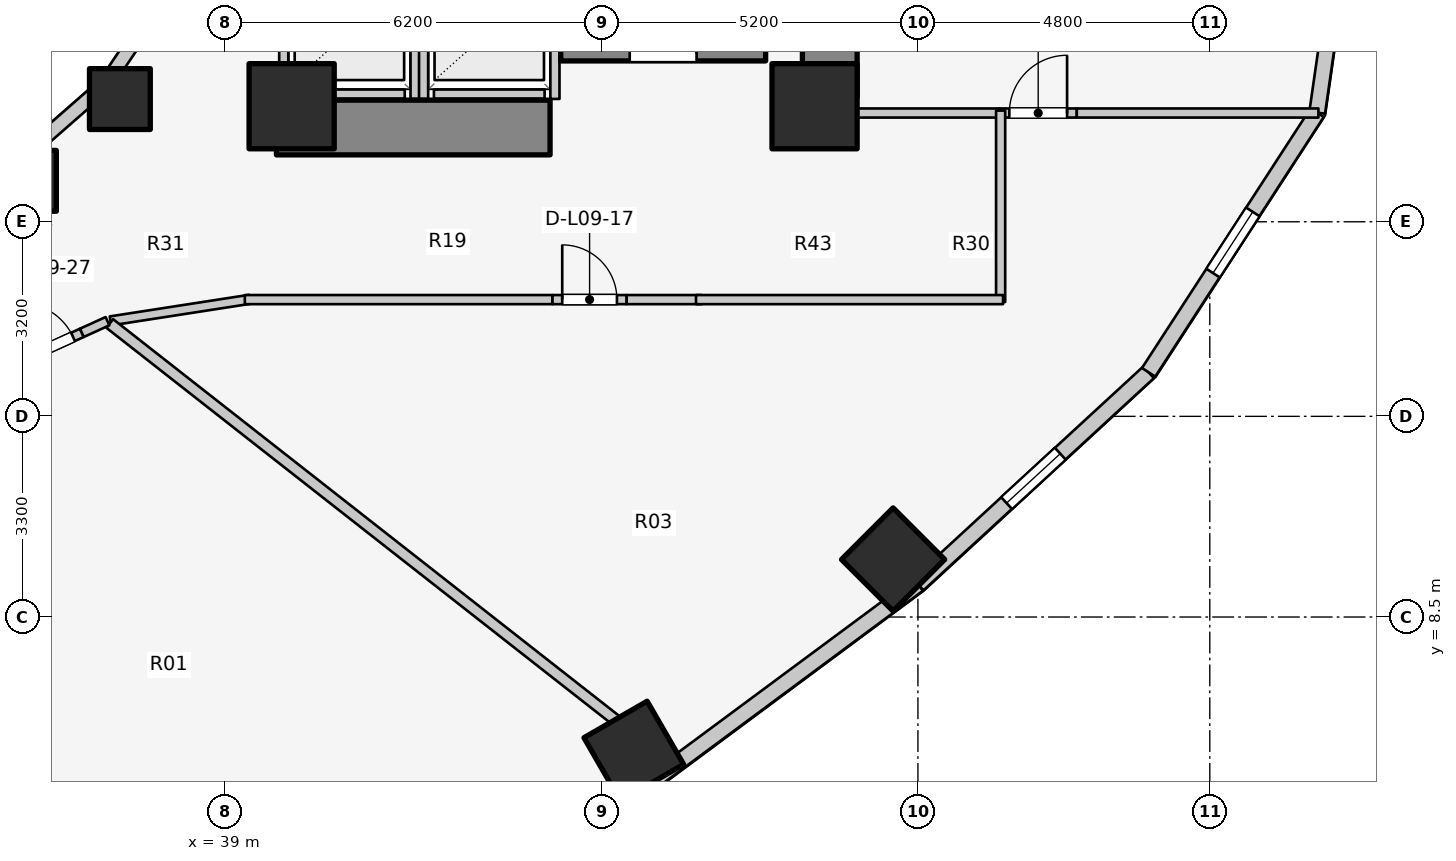
"""IFC4 building model, lengths in metres.
Left out: names, types, materials, properties, quantities, classifications, styles, units other than length and angle.
Written with IfcOpenShell. Run it as: python <this file> out.ifc"""

import sys

from ifc_helpers import new_model, si_unit, direction, frame, frame_2d, origin, origin_2d, place, context, subcontext, project, spatial, rectangle, extrude, element, fill, save


model = new_model("IFC4")
c1 = context("Model", 3, precision=1e-05, world=origin(), true_north=direction((0.0, 1.0)))
c2 = subcontext(c1, "Body", "Model", "MODEL_VIEW")
j1 = project(units=[si_unit("LENGTHUNIT", "METRE"), si_unit("PLANEANGLEUNIT", "RADIAN")], contexts=[c1])
p1 = place(None, origin())
s1 = spatial("IfcSite", under=j1, at=p1, CompositionType="ELEMENT")
p2 = place(p1, origin())
s2 = spatial("IfcBuilding", under=s1, at=p2, CompositionType="ELEMENT")
p3 = place(p2, frame((0.0, 0.0, 33.8)))
s3 = spatial("IfcBuildingStorey", under=s2, at=p3, CompositionType="ELEMENT", Elevation=33.8)
p4 = place(p3, frame((48.95, 17.05, 0.0), z_axis=(0.0, 0.0, 1.0), x_axis=(0.0, 1.0, 0.0)))
e1 = element("IfcWall", 1, at=p4, inside=s3, PredefinedType="SHEAR", context=c2, shape_type="SweptSolid", body=[
    extrude(rectangle(XDim=12.8, YDim=0.9, at=frame_2d((6.4, 0.0))), origin(), (0.0, 0.0, 1.0), 3.1),
])
p5 = place(p3, frame((39.85, 16.55, 0.0), z_axis=(0.0, 0.0, 1.0), x_axis=(1.0, 0.0, 0.0)))
e2 = element("IfcWall", 2, at=p5, inside=s3, PredefinedType="SHEAR", context=c2, shape_type="SweptSolid", body=[
    extrude(rectangle(XDim=4.5, YDim=0.9, at=frame_2d((2.25, 0.0))), origin(), (0.0, 0.0, 1.0), 3.1),
])
p6 = place(p3, frame((44.525, 17.77, 0.0), z_axis=(0.0, 0.0, 1.0), x_axis=(1.0, 0.0, 0.0)))
e3 = element("IfcWall", 3, at=p6, inside=s3, PredefinedType="SOLIDWALL", context=c2, shape_type="SweptSolid", body=[
    extrude(rectangle(XDim=3.37, YDim=0.25, at=frame_2d((1.685, 0.0))), origin(), (0.0, 0.0, 1.0), 3.1),
])
p7 = place(p6, frame((1.135, 0.0, 0.0)))
e4 = element("IfcOpeningElement", 4, at=p7, cuts=e3, PredefinedType="OPENING", context=c2, shape_type="SweptSolid", body=[
    extrude(rectangle(XDim=1.1, YDim=2.1, at=frame_2d((0.55, 1.05))), frame((0.0, 0.135, 0.0), z_axis=(0.0, -1.0, 0.0), x_axis=(1.0, 0.0, 0.0)), (0.0, 0.0, 1.0), 0.27),
])
for number, where, z_axis, x_axis in (
    (5, (40.1, 16.9, 0.0), (0.0, 0.0, 1.0), (1.0, 0.0, 0.0)),
    (6, (48.7, 16.9, 0.0), (0.0, 0.0, 1.0), (1.0, 0.0, 0.0)),
):
    element("IfcColumn", number, at=place(p3, frame(where, z_axis=z_axis, x_axis=x_axis)), inside=s3, PredefinedType="COLUMN", context=c2, shape_type="SweptSolid", body=[
        extrude(rectangle(XDim=1.4, YDim=1.4, at=origin_2d()), origin(), (0.0, 0.0, 1.0), 3.1),
    ])
p8 = place(p3, frame((35.73, 15.673, 0.0), z_axis=(0.0, 0.0, 1.0), x_axis=(1.0, 0.0, 0.0)))
e7 = element("IfcColumn", 7, at=p8, inside=s3, PredefinedType="COLUMN", context=c2, shape_type="SweptSolid", body=[
    extrude(rectangle(XDim=1.0, YDim=1.0, at=origin_2d()), origin(), (0.0, 0.0, 1.0), 3.1),
])
p9 = place(p3, frame((45.727, 6.296, 0.0), z_axis=(0.0, 0.0, 1.0), x_axis=(0.5, -0.866025403784, 0.0)))
e8 = element("IfcColumn", 8, at=p9, inside=s3, PredefinedType="COLUMN", context=c2, shape_type="SweptSolid", body=[
    extrude(rectangle(XDim=1.2, YDim=1.2, at=origin_2d()), origin(), (0.0, 0.0, 1.0), 3.1),
])
p10 = place(p3, frame((37.275, 17.018, 0.0), z_axis=(0.0, 0.0, 1.0), x_axis=(1.0, 0.0, 0.0)))
e9 = element("IfcColumn", 9, at=p10, inside=s3, PredefinedType="COLUMN", context=c2, shape_type="SweptSolid", body=[
    extrude(rectangle(XDim=1.0, YDim=1.0, at=origin_2d()), origin(), (0.0, 0.0, 1.0), 3.1),
])
p11 = place(p3, frame((49.992, 9.446, 0.0), z_axis=(0.0, 0.0, 1.0), x_axis=(0.707106781187, -0.707106781187, 0.0)))
e10 = element("IfcColumn", 10, at=p11, inside=s3, PredefinedType="COLUMN", context=c2, shape_type="SweptSolid", body=[
    extrude(rectangle(XDim=1.2, YDim=1.2, at=origin_2d()), origin(), (0.0, 0.0, 1.0), 3.1),
])
p12 = place(p3, frame((35.56, 15.968, 0.0), z_axis=(0.0, 0.0, 1.0), x_axis=(0.752576694707, 0.658504607869, 0.0)))
e11 = element("IfcWall", 11, at=p12, inside=s3, PredefinedType="STANDARD", context=c2, shape_type="SweptSolid", body=[
    extrude(rectangle(XDim=1.959, YDim=0.23, at=frame_2d((0.98, 0.0))), origin(), (0.0, 0.0, 1.0), 1.22),
])
p13 = place(p3, frame((37.035, 17.258, 0.0), z_axis=(0.0, 0.0, 1.0), x_axis=(0.558197800898, 0.829707909492, 0.0)))
e12 = element("IfcWall", 12, at=p13, inside=s3, PredefinedType="STANDARD", context=c2, shape_type="SweptSolid", body=[
    extrude(rectangle(XDim=2.027, YDim=0.23, at=frame_2d((1.013, 0.0))), origin(), (0.0, 0.0, 1.0), 1.22),
])
p14 = place(p3, frame((46.042, 5.803, 0.0), z_axis=(0.0, 0.0, 1.0), x_axis=(0.803477531792, 0.595335078679, 0.0)))
e13 = element("IfcWall", 13, at=p14, inside=s3, PredefinedType="STANDARD", context=c2, shape_type="SweptSolid", body=[
    extrude(rectangle(XDim=5.43, YDim=0.26, at=frame_2d((2.715, 0.0))), origin(), (0.0, 0.0, 1.0), 1.22),
])
p15 = place(p3, frame((50.405, 9.035, 0.0), z_axis=(0.0, 0.0, 1.0), x_axis=(0.735655109293, 0.67735630223, 0.0)))
e14 = element("IfcWall", 14, at=p15, inside=s3, PredefinedType="STANDARD", context=c2, shape_type="SweptSolid", body=[
    extrude(rectangle(XDim=5.151, YDim=0.26, at=frame_2d((2.575, 0.0))), origin(), (0.0, 0.0, 1.0), 1.22),
])
p16 = place(p15, frame((1.976, 0.0, 0.15)))
e15 = element("IfcOpeningElement", 15, at=p16, cuts=e14, PredefinedType="OPENING", context=c2, shape_type="SweptSolid", body=[
    extrude(rectangle(XDim=1.2, YDim=0.9, at=frame_2d((0.6, 0.45))), frame((0.0, 0.14, 0.0), z_axis=(0.0, -1.0, 0.0), x_axis=(1.0, 0.0, 0.0)), (0.0, 0.0, 1.0), 0.28),
])
p17 = place(p3, frame((54.194, 12.524, 0.0), z_axis=(0.0, 0.0, 1.0), x_axis=(0.544578722263, 0.838709732421, 0.0)))
e16 = element("IfcWall", 16, at=p17, inside=s3, PredefinedType="STANDARD", context=c2, shape_type="SweptSolid", body=[
    extrude(rectangle(XDim=5.092, YDim=0.26, at=frame_2d((2.546, 0.0))), origin(), (0.0, 0.0, 1.0), 1.22),
])
p18 = place(p17, frame((1.946, 0.0, 0.15)))
e17 = element("IfcOpeningElement", 17, at=p18, cuts=e16, PredefinedType="OPENING", context=c2, shape_type="SweptSolid", body=[
    extrude(rectangle(XDim=1.2, YDim=0.9, at=frame_2d((0.6, 0.45))), frame((0.0, 0.14, 0.0), z_axis=(0.0, -1.0, 0.0), x_axis=(1.0, 0.0, 0.0)), (0.0, 0.0, 1.0), 0.28),
])
p19 = place(p3, frame((56.967, 16.795, 0.0), z_axis=(0.0, 0.0, 1.0), x_axis=(0.142528001686, 0.989790770181, 0.0)))
e18 = element("IfcWall", 18, at=p19, inside=s3, PredefinedType="STANDARD", context=c2, shape_type="SweptSolid", body=[
    extrude(rectangle(XDim=6.269, YDim=0.26, at=frame_2d((3.135, 0.0))), origin(), (0.0, 0.0, 1.0), 2.57),
])
p20 = place(p19, frame((1.852, 0.0, 0.75)))
e19 = element("IfcOpeningElement", 19, at=p20, cuts=e18, PredefinedType="OPENING", context=c2, shape_type="SweptSolid", body=[
    extrude(rectangle(XDim=1.2, YDim=1.5, at=frame_2d((0.6, 0.75))), frame((0.0, 0.14, 0.0), z_axis=(0.0, -1.0, 0.0), x_axis=(1.0, 0.0, 0.0)), (0.0, 0.0, 1.0), 0.28),
])
p21 = place(p3, frame((40.14, 17.1, 0.0), z_axis=(0.0, 0.0, 1.0), x_axis=(1.0, 0.0, 0.0)))
e20 = element("IfcWall", 20, at=p21, inside=s3, PredefinedType="SOLIDWALL", context=c2, shape_type="SweptSolid", body=[
    extrude(rectangle(XDim=1.82, YDim=0.15, at=frame_2d((0.91, 0.0))), origin(), (0.0, 0.0, 1.0), 2.12),
])
p22 = place(p3, frame((39.97, 17.02, 0.0), z_axis=(0.0, 0.0, 1.0), x_axis=(0.0, 1.0, 0.0)))
e21 = element("IfcWall", 21, at=p22, inside=s3, PredefinedType="SOLIDWALL", context=c2, shape_type="SweptSolid", body=[
    extrude(rectangle(XDim=2.22, YDim=0.15, at=frame_2d((1.11, 0.0))), origin(), (0.0, 0.0, 1.0), 1.873),
])
p23 = place(p3, frame((42.13, 17.02, 0.0), z_axis=(0.0, 0.0, 1.0), x_axis=(0.0, 1.0, 0.0)))
e22 = element("IfcWall", 22, at=p23, inside=s3, PredefinedType="SOLIDWALL", context=c2, shape_type="SweptSolid", body=[
    extrude(rectangle(XDim=2.22, YDim=0.15, at=frame_2d((1.11, 0.0))), origin(), (0.0, 0.0, 1.0), 2.575),
])
p24 = place(p3, frame((42.44, 17.1, 0.0), z_axis=(0.0, 0.0, 1.0), x_axis=(1.0, 0.0, 0.0)))
e23 = element("IfcWall", 23, at=p24, inside=s3, PredefinedType="SOLIDWALL", context=c2, shape_type="SweptSolid", body=[
    extrude(rectangle(XDim=1.82, YDim=0.15, at=frame_2d((0.91, 0.0))), origin(), (0.0, 0.0, 1.0), 2.575),
])
p25 = place(p3, frame((42.27, 17.02, 0.0), z_axis=(0.0, 0.0, 1.0), x_axis=(0.0, 1.0, 0.0)))
e24 = element("IfcWall", 24, at=p25, inside=s3, PredefinedType="SOLIDWALL", context=c2, shape_type="SweptSolid", body=[
    extrude(rectangle(XDim=2.22, YDim=0.15, at=frame_2d((1.11, 0.0))), origin(), (0.0, 0.0, 1.0), 2.575),
])
p26 = place(p3, frame((44.43, 17.02, 0.0), z_axis=(0.0, 0.0, 1.0), x_axis=(0.0, 1.0, 0.0)))
e25 = element("IfcWall", 25, at=p26, inside=s3, PredefinedType="SOLIDWALL", context=c2, shape_type="SweptSolid", body=[
    extrude(rectangle(XDim=2.22, YDim=0.15, at=frame_2d((1.11, 0.0))), origin(), (0.0, 0.0, 1.0), 2.12),
])
p27 = place(p3, frame((48.95, 16.788, 0.0), z_axis=(0.0, 0.0, 1.0), x_axis=(1.0, 0.0, 0.0)))
e26 = element("IfcWall", 26, at=p27, inside=s3, PredefinedType="PARTITIONING", context=c2, shape_type="SweptSolid", body=[
    extrude(rectangle(XDim=2.793, YDim=0.15, at=frame_2d((1.396, 0.0))), origin(), (0.0, 0.0, 1.0), 1.22),
])
p28 = place(p3, frame((51.743, 16.788, 0.0), z_axis=(0.0, 0.0, 1.0), x_axis=(1.0, 0.0, 0.0)))
e27 = element("IfcWall", 27, at=p28, inside=s3, PredefinedType="PARTITIONING", context=c2, shape_type="SweptSolid", body=[
    extrude(rectangle(XDim=1.27, YDim=0.15, at=frame_2d((0.635, 0.0))), origin(), (0.0, 0.0, 1.0), 2.575),
])
p29 = place(p28, frame((0.16, 0.0, 0.0)))
e28 = element("IfcOpeningElement", 28, at=p29, cuts=e27, PredefinedType="OPENING", context=c2, shape_type="SweptSolid", body=[
    extrude(rectangle(XDim=0.95, YDim=2.1, at=frame_2d((0.475, 1.05))), frame((0.0, 0.085, 0.0), z_axis=(0.0, -1.0, 0.0), x_axis=(1.0, 0.0, 0.0)), (0.0, 0.0, 1.0), 0.17),
])
p30 = place(p3, frame((53.013, 16.788, 0.0), z_axis=(0.0, 0.0, 1.0), x_axis=(1.0, 0.0, 0.0)))
e29 = element("IfcWall", 29, at=p30, inside=s3, PredefinedType="PARTITIONING", context=c2, shape_type="SweptSolid", body=[
    extrude(rectangle(XDim=3.973, YDim=0.15, at=frame_2d((1.987, 0.0))), origin(), (0.0, 0.0, 1.0), 2.575),
])
p31 = place(p3, frame((51.76, 13.68, 0.0), z_axis=(0.0, 0.0, 1.0), x_axis=(0.0, 1.0, 0.0)))
e30 = element("IfcWall", 30, at=p31, inside=s3, PredefinedType="PARTITIONING", context=c2, shape_type="SweptSolid", body=[
    extrude(rectangle(XDim=3.148, YDim=0.15, at=frame_2d((1.574, 0.0))), origin(), (0.0, 0.0, 1.0), 2.575),
])
p32 = place(p3, frame((37.119, 13.369, 0.0), z_axis=(0.0, 0.0, 1.0), x_axis=(0.988184633586, 0.153268163508, 0.0)))
e31 = element("IfcWall", 31, at=p32, inside=s3, PredefinedType="PARTITIONING", context=c2, shape_type="SweptSolid", body=[
    extrude(rectangle(XDim=2.318, YDim=0.15, at=frame_2d((1.159, 0.0))), origin(), (0.0, 0.0, 1.0), 1.22),
])
p33 = place(p3, frame((39.33, 13.72, 0.0), z_axis=(0.0, 0.0, 1.0), x_axis=(1.0, 0.0, 0.0)))
e32 = element("IfcWall", 32, at=p33, inside=s3, PredefinedType="PARTITIONING", context=c2, shape_type="SweptSolid", body=[
    extrude(rectangle(XDim=5.06, YDim=0.15, at=frame_2d((2.53, 0.0))), origin(), (0.0, 0.0, 1.0), 1.22),
])
p34 = place(p3, frame((44.39, 13.72, 0.0), z_axis=(0.0, 0.0, 1.0), x_axis=(1.0, 0.0, 0.0)))
e33 = element("IfcWall", 33, at=p34, inside=s3, PredefinedType="PARTITIONING", context=c2, shape_type="SweptSolid", body=[
    extrude(rectangle(XDim=1.22, YDim=0.15, at=frame_2d((0.61, 0.0))), origin(), (0.0, 0.0, 1.0), 2.575),
])
p35 = place(p34, frame((0.16, 0.0, 0.0)))
e34 = element("IfcOpeningElement", 34, at=p35, cuts=e33, PredefinedType="OPENING", context=c2, shape_type="SweptSolid", body=[
    extrude(rectangle(XDim=0.9, YDim=2.1, at=frame_2d((0.45, 1.05))), frame((0.0, 0.085, 0.0), z_axis=(0.0, -1.0, 0.0), x_axis=(1.0, 0.0, 0.0)), (0.0, 0.0, 1.0), 0.17),
])
p36 = place(p3, frame((45.61, 13.72, 0.0), z_axis=(0.0, 0.0, 1.0), x_axis=(1.0, 0.0, 0.0)))
e35 = element("IfcWall", 35, at=p36, inside=s3, PredefinedType="PARTITIONING", context=c2, shape_type="SweptSolid", body=[
    extrude(rectangle(XDim=1.24, YDim=0.15, at=frame_2d((0.62, 0.0))), origin(), (0.0, 0.0, 1.0), 2.575),
])
p37 = place(p3, frame((46.75, 13.72, 0.0), z_axis=(0.0, 0.0, 1.0), x_axis=(1.0, 0.0, 0.0)))
e36 = element("IfcWall", 36, at=p37, inside=s3, PredefinedType="PARTITIONING", context=c2, shape_type="SweptSolid", body=[
    extrude(rectangle(XDim=5.05, YDim=0.15, at=frame_2d((2.525, 0.0))), origin(), (0.0, 0.0, 1.0), 1.22),
])
p38 = place(p3, frame((37.108, 13.327, 0.0), z_axis=(0.0, 0.0, 1.0), x_axis=(0.78700868866, -0.616941912966, 0.0)))
e37 = element("IfcWall", 37, at=p38, inside=s3, PredefinedType="PARTITIONING", context=c2, shape_type="SweptSolid", body=[
    extrude(rectangle(XDim=10.583, YDim=0.18, at=frame_2d((5.292, 0.0))), origin(), (0.0, 0.0, 1.0), 1.22),
])
p39 = place(p3, frame((35.494, 12.647, 0.0), z_axis=(0.0, 0.0, 1.0), x_axis=(0.910168885926, 0.414237370469, 0.0)))
e38 = element("IfcWall", 38, at=p39, inside=s3, PredefinedType="PARTITIONING", context=c2, shape_type="SweptSolid", body=[
    extrude(rectangle(XDim=1.27, YDim=0.15, at=frame_2d((0.635, 0.0))), origin(), (0.0, 0.0, 1.0), 2.16),
])
p40 = place(p39, frame((0.16, 0.0, 0.0)))
e39 = element("IfcOpeningElement", 39, at=p40, cuts=e38, PredefinedType="OPENING", context=c2, shape_type="SweptSolid", body=[
    extrude(rectangle(XDim=0.95, YDim=2.1, at=frame_2d((0.475, 1.05))), frame((0.0, 0.085, 0.0), z_axis=(0.0, -1.0, 0.0), x_axis=(1.0, 0.0, 0.0)), (0.0, 0.0, 1.0), 0.17),
])
p41 = place(p3, frame((36.65, 13.173, 0.0), z_axis=(0.0, 0.0, 1.0), x_axis=(0.910185690705, 0.414200444756, 0.0)))
e40 = element("IfcWall", 40, at=p41, inside=s3, PredefinedType="PARTITIONING", context=c2, shape_type="SweptSolid", body=[
    extrude(rectangle(XDim=0.463, YDim=0.15, at=frame_2d((0.231, 0.0))), origin(), (0.0, 0.0, 1.0), 2.575),
])
p42 = place(p16, origin())
e41 = element("IfcWindow", 41, at=p42, inside=s3, PartitioningType="SINGLE_PANEL", PredefinedType="WINDOW", context=c2, shape_type="SweptSolid", body=[
    extrude(rectangle(XDim=1.2, YDim=0.9, at=frame_2d((0.6, 0.45))), frame((0.0, 0.03, 0.0), z_axis=(0.0, -1.0, 0.0), x_axis=(1.0, 0.0, 0.0)), (0.0, 0.0, 1.0), 0.06),
])
fill(e15, e41)
p43 = place(p18, origin())
e42 = element("IfcWindow", 42, at=p43, inside=s3, PartitioningType="SINGLE_PANEL", PredefinedType="WINDOW", context=c2, shape_type="SweptSolid", body=[
    extrude(rectangle(XDim=1.2, YDim=0.9, at=frame_2d((0.6, 0.45))), frame((0.0, 0.03, 0.0), z_axis=(0.0, -1.0, 0.0), x_axis=(1.0, 0.0, 0.0)), (0.0, 0.0, 1.0), 0.06),
])
fill(e17, e42)
p44 = place(p7, origin())
e43 = element("IfcDoor", 43, at=p44, inside=s3, OperationType="SINGLE_SWING_RIGHT", PredefinedType="DOOR", context=c2, shape_type="SweptSolid", body=[
    extrude(rectangle(XDim=1.1, YDim=2.1, at=frame_2d((0.55, 1.05))), frame((0.0, 0.025, 0.0), z_axis=(0.0, -1.0, 0.0), x_axis=(1.0, 0.0, 0.0)), (0.0, 0.0, 1.0), 0.05),
])
fill(e4, e43)
p45 = place(p29, origin())
e44 = element("IfcDoor", 44, at=p45, inside=s3, OperationType="SINGLE_SWING_RIGHT", PredefinedType="DOOR", context=c2, shape_type="SweptSolid", body=[
    extrude(rectangle(XDim=0.95, YDim=2.1, at=frame_2d((0.475, 1.05))), frame((0.0, 0.025, 0.0), z_axis=(0.0, -1.0, 0.0), x_axis=(1.0, 0.0, 0.0)), (0.0, 0.0, 1.0), 0.05),
])
fill(e28, e44)
p46 = place(p35, origin())
e45 = element("IfcDoor", 45, at=p46, inside=s3, OperationType="SINGLE_SWING_LEFT", PredefinedType="DOOR", context=c2, shape_type="SweptSolid", body=[
    extrude(rectangle(XDim=0.9, YDim=2.1, at=frame_2d((0.45, 1.05))), frame((0.0, 0.025, 0.0), z_axis=(0.0, -1.0, 0.0), x_axis=(1.0, 0.0, 0.0)), (0.0, 0.0, 1.0), 0.05),
])
fill(e34, e45)
p47 = place(p40, origin())
e46 = element("IfcDoor", 46, at=p47, inside=s3, OperationType="SINGLE_SWING_LEFT", PredefinedType="DOOR", context=c2, shape_type="SweptSolid", body=[
    extrude(rectangle(XDim=0.95, YDim=2.1, at=frame_2d((0.475, 1.05))), frame((0.0, 0.025, 0.0), z_axis=(0.0, -1.0, 0.0), x_axis=(1.0, 0.0, 0.0)), (0.0, 0.0, 1.0), 0.05),
])
fill(e39, e46)
save(model, sys.argv[1])
